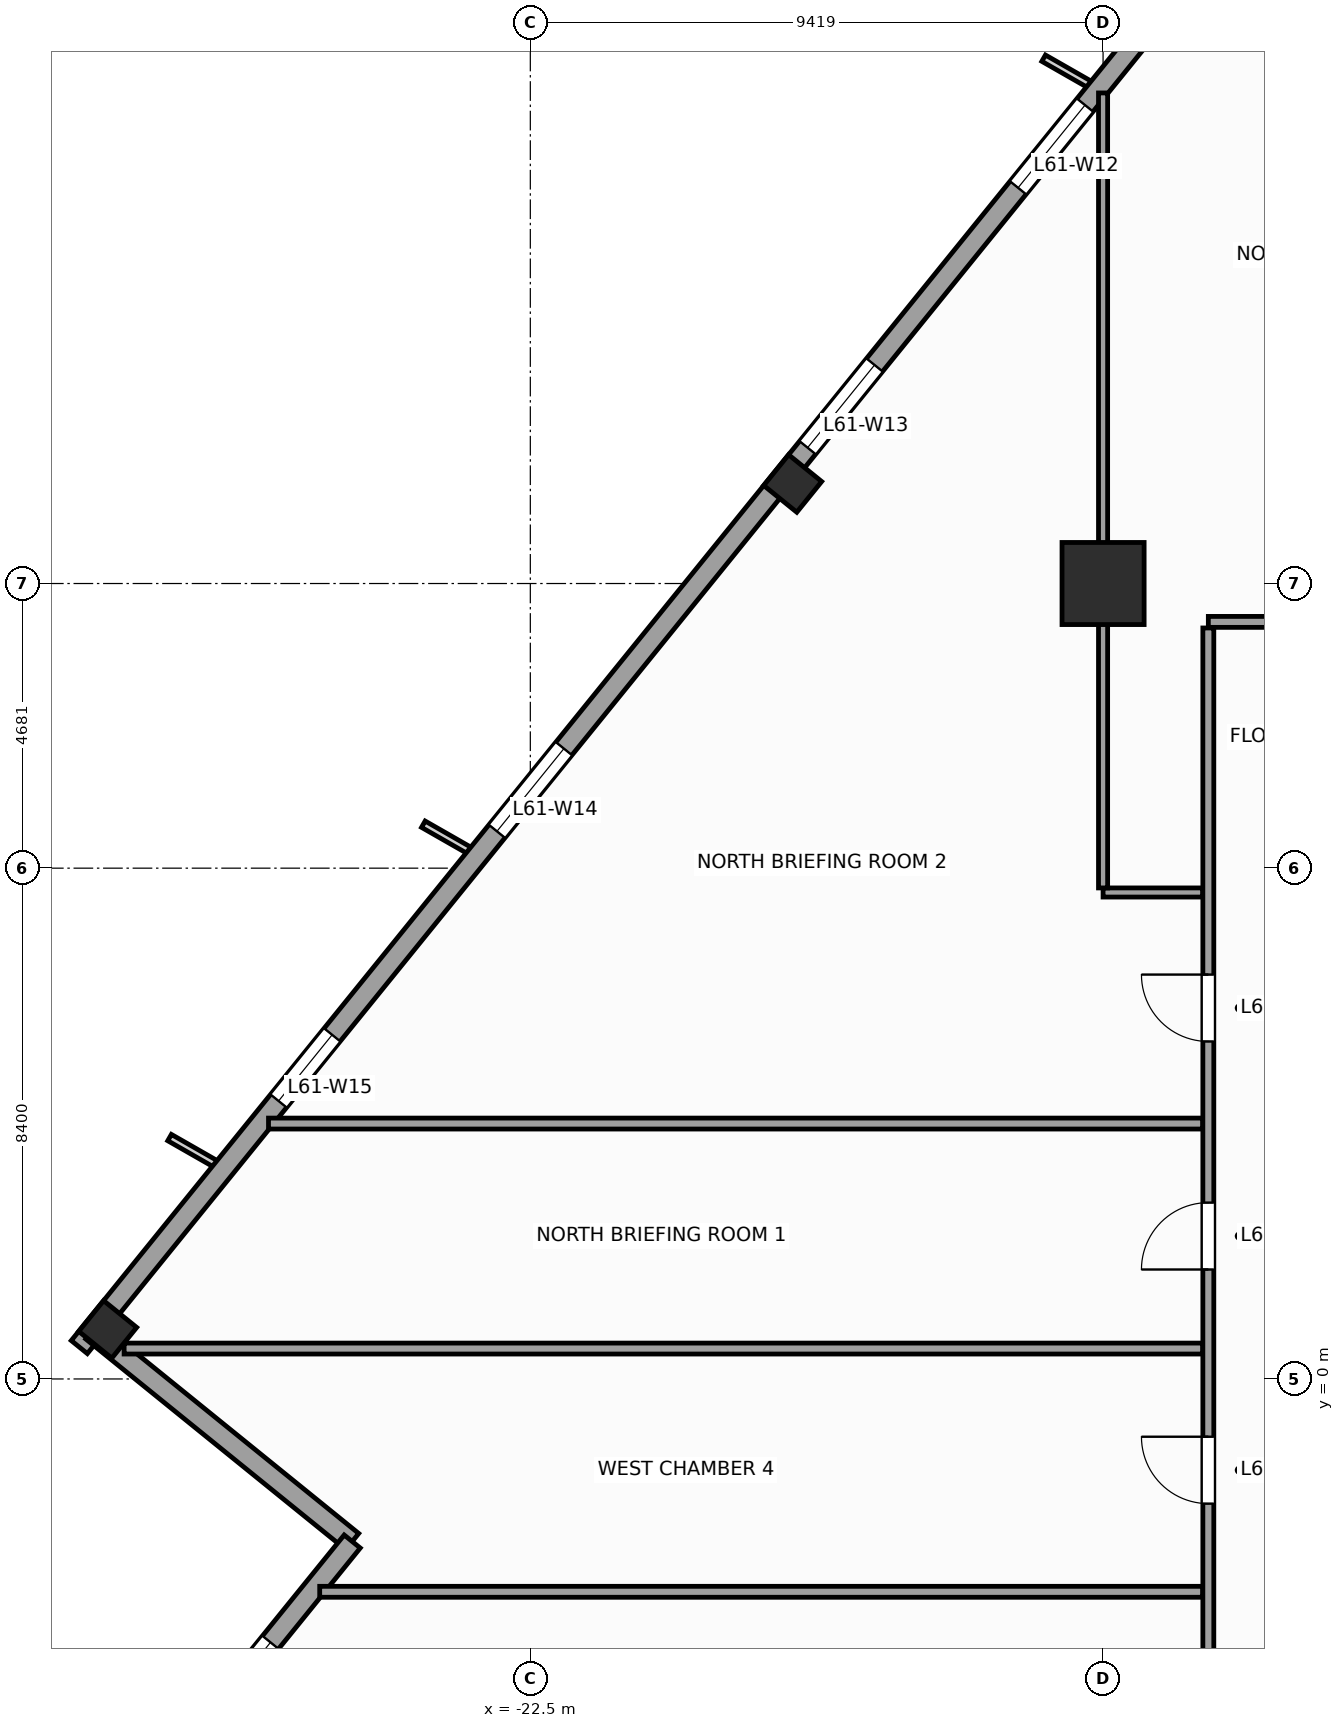
"""IFC4 building model, lengths in metres.
Left out: names, types, materials, properties, quantities, classifications, styles, units other than length and angle.
Written with IfcOpenShell. Run it as: python <this file> out.ifc"""

import sys

from ifc_helpers import new_model, si_unit, direction, frame, frame_2d, origin, origin_2d, place, context, subcontext, project, spatial, rectangle, extrude, source, transform, mapped, element, fill, save


model = new_model("IFC4")
c1 = context("Model", 3, precision=1e-05, world=origin(), true_north=direction((0.0, 1.0)))
c2 = subcontext(c1, "Body", "Model", "MODEL_VIEW")
j1 = project(units=[si_unit("LENGTHUNIT", "METRE"), si_unit("PLANEANGLEUNIT", "RADIAN")], contexts=[c1])
p1 = place(None, origin())
s1 = spatial("IfcSite", under=j1, at=p1, CompositionType="ELEMENT")
p2 = place(p1, origin())
s2 = spatial("IfcBuilding", under=s1, at=p2, CompositionType="ELEMENT")
p3 = place(p2, frame((0.0, 0.0, 252.4)))
s3 = spatial("IfcBuildingStorey", under=s2, at=p3, CompositionType="ELEMENT", Elevation=252.4)
m1 = source(origin(), c2, "Body", "SweptSolid", [
    extrude(rectangle(XDim=1.35, YDim=1.35, at=origin_2d()), origin(), (0.0, 0.0, 1.0), 3.9),
])
p4 = place(p3, frame((-13.081, 13.081, 0.0), z_axis=(0.0, 0.0, 1.0), x_axis=(1.0, 0.0, 0.0)))
e1 = element("IfcColumn", 1, at=p4, inside=s3, PredefinedType="COLUMN", context=c2, shape_type="MappedRepresentation", body=[
    mapped(m1, transform((0.0, 0.0, 0.0), scale=1.0)),
])
m2 = source(origin(), c2, "Body", "SweptSolid", [
    extrude(rectangle(XDim=0.65, YDim=0.7, at=origin_2d()), origin(), (0.0, 0.0, 1.0), 3.9),
])
for number, where, z_axis, x_axis in (
    (2, (-18.185, 14.726, 0.0), (0.0, 0.0, 1.0), (0.629, 0.777, 0.0)),
    (3, (-29.45, 0.815, 0.0), (0.0, 0.0, 1.0), (0.629, 0.777, 0.0)),
):
    element("IfcColumn", number, at=place(p3, frame(where, z_axis=z_axis, x_axis=x_axis)), inside=s3, PredefinedType="COLUMN", context=c2, shape_type="MappedRepresentation", body=[
        mapped(m2, transform((0.0, 0.0, 0.0), scale=1.0)),
    ])
p5 = place(p3, frame((-6.733, 29.154, 0.0), z_axis=(0.0, 0.0, 1.0), x_axis=(-0.629325378072, -0.77714192302, 0.0)))
e4 = element("IfcWall", 4, at=p5, inside=s3, PredefinedType="STANDARD", context=c2, shape_type="SweptSolid", body=[
    extrude(rectangle(XDim=36.84, YDim=0.34, at=frame_2d((18.42, 0.0))), origin(), (0.0, 0.0, 1.0), 2.96),
])
p6 = place(p5, frame((3.721, 0.0, 0.48)))
e5 = element("IfcOpeningElement", 5, at=p6, cuts=e4, PredefinedType="OPENING", context=c2, shape_type="SweptSolid", body=[
    extrude(rectangle(XDim=1.4, YDim=2.4, at=frame_2d((0.7, 1.2))), frame((0.0, 0.18, 0.0), z_axis=(0.0, -1.0, 0.0), x_axis=(1.0, 0.0, 0.0)), (0.0, 0.0, 1.0), 0.36),
])
p7 = place(p5, frame((10.559, 0.0, 0.58)))
e6 = element("IfcOpeningElement", 6, at=p7, cuts=e4, PredefinedType="OPENING", context=c2, shape_type="SweptSolid", body=[
    extrude(rectangle(XDim=1.75, YDim=2.3, at=frame_2d((0.875, 1.15))), frame((0.0, 0.18, 0.0), z_axis=(0.0, -1.0, 0.0), x_axis=(1.0, 0.0, 0.0)), (0.0, 0.0, 1.0), 0.36),
])
p8 = place(p5, frame((16.058, 0.0, 0.58)))
e7 = element("IfcOpeningElement", 7, at=p8, cuts=e4, PredefinedType="OPENING", context=c2, shape_type="SweptSolid", body=[
    extrude(rectangle(XDim=1.75, YDim=2.3, at=frame_2d((0.875, 1.15))), frame((0.0, 0.18, 0.0), z_axis=(0.0, -1.0, 0.0), x_axis=(1.0, 0.0, 0.0)), (0.0, 0.0, 1.0), 0.36),
])
p9 = place(p5, frame((24.176, 0.0, 0.58)))
e8 = element("IfcOpeningElement", 8, at=p9, cuts=e4, PredefinedType="OPENING", context=c2, shape_type="SweptSolid", body=[
    extrude(rectangle(XDim=1.75, YDim=2.3, at=frame_2d((0.875, 1.15))), frame((0.0, 0.18, 0.0), z_axis=(0.0, -1.0, 0.0), x_axis=(1.0, 0.0, 0.0)), (0.0, 0.0, 1.0), 0.36),
])
p10 = place(p5, frame((30.232, 0.0, 0.48)))
e9 = element("IfcOpeningElement", 9, at=p10, cuts=e4, PredefinedType="OPENING", context=c2, shape_type="SweptSolid", body=[
    extrude(rectangle(XDim=1.4, YDim=2.4, at=frame_2d((0.7, 1.2))), frame((0.0, 0.18, 0.0), z_axis=(0.0, -1.0, 0.0), x_axis=(1.0, 0.0, 0.0)), (0.0, 0.0, 1.0), 0.36),
])
p11 = place(p3, frame((-29.703, 0.789, 0.0), z_axis=(0.0, 0.0, 1.0), x_axis=(0.77714355312, -0.629323365087, 0.0)))
e10 = element("IfcWall", 10, at=p11, inside=s3, PredefinedType="STANDARD", context=c2, shape_type="SweptSolid", body=[
    extrude(rectangle(XDim=5.5, YDim=0.34, at=frame_2d((2.75, 0.0))), origin(), (0.0, 0.0, 1.0), 3.66),
])
p12 = place(p3, frame((-25.429, -2.673, 0.0), z_axis=(0.0, 0.0, 1.0), x_axis=(-0.629299794138, -0.777162640055, 0.0)))
e11 = element("IfcWall", 11, at=p12, inside=s3, PredefinedType="STANDARD", context=c2, shape_type="SweptSolid", body=[
    extrude(rectangle(XDim=5.67, YDim=0.34, at=frame_2d((2.835, 0.0))), origin(), (0.0, 0.0, 1.0), 3.66),
])
p13 = place(p12, frame((2.135, 0.0, 0.48)))
e12 = element("IfcOpeningElement", 12, at=p13, cuts=e11, PredefinedType="OPENING", context=c2, shape_type="SweptSolid", body=[
    extrude(rectangle(XDim=1.4, YDim=2.4, at=frame_2d((0.7, 1.2))), frame((0.0, 0.18, 0.0), z_axis=(0.0, -1.0, 0.0), x_axis=(1.0, 0.0, 0.0)), (0.0, 0.0, 1.0), 0.36),
])
p14 = place(p3, frame((-11.35, 12.45, 0.0), z_axis=(0.0, 0.0, 1.0), x_axis=(1.0, 0.0, 0.0)))
e13 = element("IfcWall", 13, at=p14, inside=s3, PredefinedType="PARTITIONING", context=c2, shape_type="SweptSolid", body=[
    extrude(rectangle(XDim=21.65, YDim=0.18, at=frame_2d((10.825, 0.0))), origin(), (0.0, 0.0, 1.0), 3.66),
])
p15 = place(p14, frame((2.689, 0.0, 0.0)))
e14 = element("IfcOpeningElement", 14, at=p15, cuts=e13, PredefinedType="OPENING", context=c2, shape_type="SweptSolid", body=[
    extrude(rectangle(XDim=1.1, YDim=2.2, at=frame_2d((0.55, 1.1))), frame((0.0, 0.1, 0.0), z_axis=(0.0, -1.0, 0.0), x_axis=(1.0, 0.0, 0.0)), (0.0, 0.0, 1.0), 0.2),
])
p16 = place(p14, frame((8.2, 0.0, 0.0)))
e15 = element("IfcOpeningElement", 15, at=p16, cuts=e13, PredefinedType="OPENING", context=c2, shape_type="SweptSolid", body=[
    extrude(rectangle(XDim=1.1, YDim=2.2, at=frame_2d((0.55, 1.1))), frame((0.0, 0.1, 0.0), z_axis=(0.0, -1.0, 0.0), x_axis=(1.0, 0.0, 0.0)), (0.0, 0.0, 1.0), 0.2),
])
p17 = place(p14, frame((13.4, 0.0, 0.0)))
e16 = element("IfcOpeningElement", 16, at=p17, cuts=e13, PredefinedType="OPENING", context=c2, shape_type="SweptSolid", body=[
    extrude(rectangle(XDim=1.1, YDim=2.2, at=frame_2d((0.55, 1.1))), frame((0.0, 0.1, 0.0), z_axis=(0.0, -1.0, 0.0), x_axis=(1.0, 0.0, 0.0)), (0.0, 0.0, 1.0), 0.2),
])
p18 = place(p14, frame((18.385, 0.0, 0.0)))
e17 = element("IfcOpeningElement", 17, at=p18, cuts=e13, PredefinedType="OPENING", context=c2, shape_type="SweptSolid", body=[
    extrude(rectangle(XDim=1.1, YDim=2.2, at=frame_2d((0.55, 1.1))), frame((0.0, 0.1, 0.0), z_axis=(0.0, -1.0, 0.0), x_axis=(1.0, 0.0, 0.0)), (0.0, 0.0, 1.0), 0.2),
])
p19 = place(p3, frame((-11.35, -11.3, 0.0), z_axis=(0.0, 0.0, 1.0), x_axis=(0.0, 1.0, 0.0)))
e18 = element("IfcWall", 18, at=p19, inside=s3, PredefinedType="PARTITIONING", context=c2, shape_type="SweptSolid", body=[
    extrude(rectangle(XDim=23.65, YDim=0.18, at=frame_2d((11.825, 0.0))), origin(), (0.0, 0.0, 1.0), 3.66),
])
p20 = place(p19, frame((13.1, 0.0, 0.0)))
e19 = element("IfcOpeningElement", 19, at=p20, cuts=e18, PredefinedType="OPENING", context=c2, shape_type="SweptSolid", body=[
    extrude(rectangle(XDim=1.1, YDim=2.2, at=frame_2d((0.55, 1.1))), frame((0.0, 0.1, 0.0), z_axis=(0.0, -1.0, 0.0), x_axis=(1.0, 0.0, 0.0)), (0.0, 0.0, 1.0), 0.2),
])
p21 = place(p19, frame((16.85, 0.0, 0.0)))
e20 = element("IfcOpeningElement", 20, at=p21, cuts=e18, PredefinedType="OPENING", context=c2, shape_type="SweptSolid", body=[
    extrude(rectangle(XDim=1.1, YDim=2.2, at=frame_2d((0.55, 1.1))), frame((0.0, 0.1, 0.0), z_axis=(0.0, -1.0, 0.0), x_axis=(1.0, 0.0, 0.0)), (0.0, 0.0, 1.0), 0.2),
])
p22 = place(p19, frame((5.0, 0.0, 0.0)))
e21 = element("IfcOpeningElement", 21, at=p22, cuts=e18, PredefinedType="OPENING", context=c2, shape_type="SweptSolid", body=[
    extrude(rectangle(XDim=1.1, YDim=2.2, at=frame_2d((0.55, 1.1))), frame((0.0, 0.1, 0.0), z_axis=(0.0, -1.0, 0.0), x_axis=(1.0, 0.0, 0.0)), (0.0, 0.0, 1.0), 0.2),
])
p23 = place(p19, frame((9.25, 0.0, 0.0)))
e22 = element("IfcOpeningElement", 22, at=p23, cuts=e18, PredefinedType="OPENING", context=c2, shape_type="SweptSolid", body=[
    extrude(rectangle(XDim=1.1, YDim=2.2, at=frame_2d((0.55, 1.1))), frame((0.0, 0.1, 0.0), z_axis=(0.0, -1.0, 0.0), x_axis=(1.0, 0.0, 0.0)), (0.0, 0.0, 1.0), 0.2),
])
p24 = place(p3, frame((-11.445, -3.5, 0.0), z_axis=(0.0, 0.0, 1.0), x_axis=(-1.0, 0.0, 0.0)))
e23 = element("IfcWall", 23, at=p24, inside=s3, PredefinedType="PARTITIONING", context=c2, shape_type="SweptSolid", body=[
    extrude(rectangle(XDim=14.519, YDim=0.18, at=frame_2d((7.259, 0.0))), origin(), (0.0, 0.0, 1.0), 3.66),
])
p25 = place(p3, frame((-11.445, 0.5, 0.0), z_axis=(0.0, 0.0, 1.0), x_axis=(-1.0, 0.0, 0.0)))
e24 = element("IfcWall", 24, at=p25, inside=s3, PredefinedType="PARTITIONING", context=c2, shape_type="SweptSolid", body=[
    extrude(rectangle(XDim=17.735, YDim=0.18, at=frame_2d((8.867, 0.0))), origin(), (0.0, 0.0, 1.0), 3.66),
])
p26 = place(p3, frame((-11.445, 4.2, 0.0), z_axis=(0.0, 0.0, 1.0), x_axis=(-1.0, 0.0, 0.0)))
e25 = element("IfcWall", 25, at=p26, inside=s3, PredefinedType="PARTITIONING", context=c2, shape_type="SweptSolid", body=[
    extrude(rectangle(XDim=15.361, YDim=0.18, at=frame_2d((7.68, 0.0))), origin(), (0.0, 0.0, 1.0), 3.66),
])
p27 = place(p3, frame((-11.445, 8.0, 0.0), z_axis=(0.0, 0.0, 1.0), x_axis=(-1.0, 0.0, 0.0)))
e26 = element("IfcWall", 26, at=p27, inside=s3, PredefinedType="PARTITIONING", context=c2, shape_type="SweptSolid", body=[
    extrude(rectangle(XDim=1.636, YDim=0.15, at=frame_2d((0.818, 0.0))), origin(), (0.0, 0.0, 1.0), 3.66),
])
p28 = place(p3, frame((-13.081, 8.075, 0.0), z_axis=(0.0, 0.0, 1.0), x_axis=(0.0, 1.0, 0.0)))
e27 = element("IfcWall", 27, at=p28, inside=s3, PredefinedType="PARTITIONING", context=c2, shape_type="SweptSolid", body=[
    extrude(rectangle(XDim=13.073, YDim=0.15, at=frame_2d((6.537, 0.0))), origin(), (0.0, 0.0, 1.0), 2.76),
])
m3 = source(origin(), c2, "Body", "SweptSolid", [
    extrude(rectangle(XDim=1.75, YDim=2.3, at=frame_2d((0.875, 1.15))), frame((0.0, 0.03, 0.0), z_axis=(0.0, -1.0, 0.0), x_axis=(1.0, 0.0, 0.0)), (0.0, 0.0, 1.0), 0.06),
])
p29 = place(p7, origin())
e28 = element("IfcWindow", 28, at=p29, inside=s3, PartitioningType="SINGLE_PANEL", PredefinedType="WINDOW", context=c2, shape_type="MappedRepresentation", body=[
    mapped(m3, transform((0.0, 0.0, 0.0), scale=1.0)),
])
fill(e6, e28)
p30 = place(p8, origin())
e29 = element("IfcWindow", 29, at=p30, inside=s3, PartitioningType="SINGLE_PANEL", PredefinedType="WINDOW", context=c2, shape_type="MappedRepresentation", body=[
    mapped(m3, transform((0.0, 0.0, 0.0), scale=1.0)),
])
fill(e7, e29)
p31 = place(p9, origin())
e30 = element("IfcWindow", 30, at=p31, inside=s3, PartitioningType="SINGLE_PANEL", PredefinedType="WINDOW", context=c2, shape_type="MappedRepresentation", body=[
    mapped(m3, transform((0.0, 0.0, 0.0), scale=1.0)),
])
fill(e8, e30)
m4 = source(origin(), c2, "Body", "SweptSolid", [
    extrude(rectangle(XDim=1.4, YDim=2.4, at=frame_2d((0.7, 1.2))), frame((0.0, 0.03, 0.0), z_axis=(0.0, -1.0, 0.0), x_axis=(1.0, 0.0, 0.0)), (0.0, 0.0, 1.0), 0.06),
])
p32 = place(p10, origin())
e31 = element("IfcWindow", 31, at=p32, inside=s3, PartitioningType="SINGLE_PANEL", PredefinedType="WINDOW", context=c2, shape_type="MappedRepresentation", body=[
    mapped(m4, transform((0.0, 0.0, 0.0), scale=1.0)),
])
fill(e9, e31)
p33 = place(p13, origin())
e32 = element("IfcWindow", 32, at=p33, inside=s3, PartitioningType="SINGLE_PANEL", PredefinedType="WINDOW", context=c2, shape_type="MappedRepresentation", body=[
    mapped(m4, transform((0.0, 0.0, 0.0), scale=1.0)),
])
fill(e12, e32)
m5 = source(origin(), c2, "Body", "SweptSolid", [
    extrude(rectangle(XDim=1.1, YDim=2.2, at=frame_2d((0.55, 1.1))), frame((0.0, 0.025, 0.0), z_axis=(0.0, -1.0, 0.0), x_axis=(1.0, 0.0, 0.0)), (0.0, 0.0, 1.0), 0.05),
])
p34 = place(p20, origin())
e33 = element("IfcDoor", 33, at=p34, inside=s3, OperationType="SINGLE_SWING_LEFT", PredefinedType="DOOR", context=c2, shape_type="MappedRepresentation", body=[
    mapped(m5, transform((0.0, 0.0, 0.0), scale=1.0)),
])
fill(e19, e33)
p35 = place(p21, origin())
e34 = element("IfcDoor", 34, at=p35, inside=s3, OperationType="SINGLE_SWING_RIGHT", PredefinedType="DOOR", context=c2, shape_type="MappedRepresentation", body=[
    mapped(m5, transform((0.0, 0.0, 0.0), scale=1.0)),
])
fill(e20, e34)
p36 = place(p23, origin())
e35 = element("IfcDoor", 35, at=p36, inside=s3, OperationType="SINGLE_SWING_RIGHT", PredefinedType="DOOR", context=c2, shape_type="MappedRepresentation", body=[
    mapped(m5, transform((0.0, 0.0, 0.0), scale=1.0)),
])
fill(e22, e35)
save(model, sys.argv[1])
